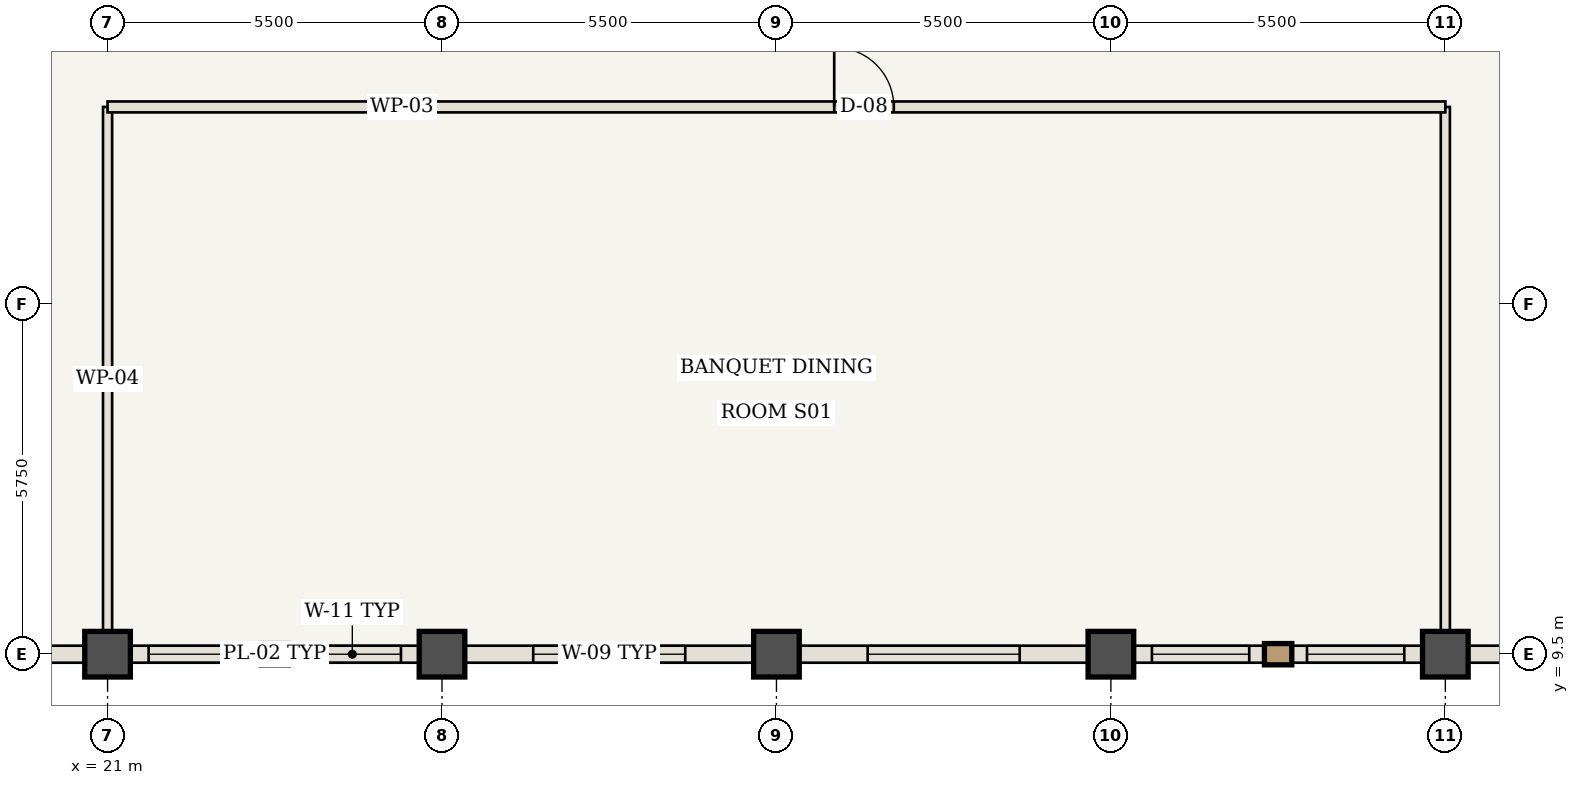
"""IFC4 building model, lengths in metres.
Left out: names, types, materials, properties, quantities, classifications, styles, units other than length and angle.
Written with IfcOpenShell. Run it as: python <this file> out.ifc"""

import sys

from ifc_helpers import new_model, si_unit, direction, frame, frame_2d, origin, origin_2d, place, context, subcontext, project, spatial, rectangle, extrude, element, fill, save


model = new_model("IFC4")
c1 = context("Model", 3, precision=1e-05, world=origin(), true_north=direction((0.0, 1.0)))
c2 = subcontext(c1, "Body", "Model", "MODEL_VIEW")
j1 = project(units=[si_unit("LENGTHUNIT", "METRE"), si_unit("PLANEANGLEUNIT", "RADIAN")], contexts=[c1])
p1 = place(None, origin())
s1 = spatial("IfcSite", under=j1, at=p1, CompositionType="ELEMENT")
p2 = place(p1, origin())
s2 = spatial("IfcBuilding", under=s1, at=p2, CompositionType="ELEMENT")
p3 = place(p2, frame((0.0, 0.0, 296.8)))
s3 = spatial("IfcBuildingStorey", under=s2, at=p3, CompositionType="ELEMENT", Elevation=296.8)
for number, where, z_axis, x_axis in (
    (1, (21.0, 9.5, 0.0), (0.0, 0.0, 1.0), (1.0, 0.0, 0.0)),
    (2, (26.5, 9.5, 0.0), (0.0, 0.0, 1.0), (1.0, 0.0, 0.0)),
    (3, (32.0, 9.5, 0.0), (0.0, 0.0, 1.0), (1.0, 0.0, 0.0)),
    (4, (37.5, 9.5, 0.0), (0.0, 0.0, 1.0), (1.0, 0.0, 0.0)),
    (5, (43.0, 9.5, 0.0), (0.0, 0.0, 1.0), (1.0, 0.0, 0.0)),
):
    element("IfcColumn", number, at=place(p3, frame(where, z_axis=z_axis, x_axis=x_axis)), inside=s3, PredefinedType="COLUMN", context=c2, shape_type="SweptSolid", body=[
        extrude(rectangle(XDim=0.75, YDim=0.75, at=origin_2d()), origin(), (0.0, 0.0, 1.0), 3.85),
    ])
for number, where, z_axis, x_axis in (
    (6, (21.0, 9.56, 0.0), (0.0, 0.0, 1.0), (0.0, 1.0, 0.0)),
    (7, (43.0, 9.56, 0.0), (0.0, 0.0, 1.0), (0.0, 1.0, 0.0)),
):
    element("IfcWall", number, at=place(p3, frame(where, z_axis=z_axis, x_axis=x_axis)), inside=s3, PredefinedType="STANDARD", context=c2, shape_type="SweptSolid", body=[
        extrude(rectangle(XDim=8.94, YDim=0.15, at=frame_2d((4.47, 0.0))), origin(), (0.0, 0.0, 1.0), 3.685),
    ])
p4 = place(p3, frame((21.0, 18.5, 0.0), z_axis=(0.0, 0.0, 1.0), x_axis=(1.0, 0.0, 0.0)))
e8 = element("IfcWall", 8, at=p4, inside=s3, PredefinedType="STANDARD", context=c2, shape_type="SweptSolid", body=[
    extrude(rectangle(XDim=22.0, YDim=0.18, at=frame_2d((11.0, 0.0))), origin(), (0.0, 0.0, 1.0), 3.685),
])
p5 = place(p4, frame((11.95, 0.0, 0.0)))
e9 = element("IfcOpeningElement", 9, at=p5, cuts=e8, PredefinedType="OPENING", context=c2, shape_type="SweptSolid", body=[
    extrude(rectangle(XDim=0.98, YDim=2.2, at=frame_2d((0.49, 1.1))), frame((0.0, 0.1, 0.0), z_axis=(0.0, -1.0, 0.0), x_axis=(1.0, 0.0, 0.0)), (0.0, 0.0, 1.0), 0.2),
])
p6 = place(p3, frame((21.0, 9.5, 0.0), z_axis=(0.0, 0.0, 1.0), x_axis=(-1.0, 0.0, 0.0)))
e10 = element("IfcWall", 10, at=p6, inside=s3, PredefinedType="USERDEFINED", context=c2, shape_type="SweptSolid", body=[
    extrude(rectangle(XDim=5.5, YDim=0.28, at=frame_2d((2.75, 0.0))), origin(), (0.0, 0.0, 1.0), 2.985),
])
p7 = place(p3, frame((26.5, 9.5, 0.0), z_axis=(0.0, 0.0, 1.0), x_axis=(-1.0, 0.0, 0.0)))
e11 = element("IfcWall", 11, at=p7, inside=s3, PredefinedType="USERDEFINED", context=c2, shape_type="SweptSolid", body=[
    extrude(rectangle(XDim=5.5, YDim=0.28, at=frame_2d((2.75, 0.0))), origin(), (0.0, 0.0, 1.0), 2.985),
])
p8 = place(p7, frame((0.675, 0.0, 0.85)))
e12 = element("IfcOpeningElement", 12, at=p8, cuts=e11, PredefinedType="OPENING", context=c2, shape_type="SweptSolid", body=[
    extrude(rectangle(XDim=1.6, YDim=1.935, at=frame_2d((0.8, 0.968))), frame((0.0, 0.15, 0.0), z_axis=(0.0, -1.0, 0.0), x_axis=(1.0, 0.0, 0.0)), (0.0, 0.0, 1.0), 0.3),
])
p9 = place(p7, frame((3.225, 0.0, 0.85)))
e13 = element("IfcOpeningElement", 13, at=p9, cuts=e11, PredefinedType="OPENING", context=c2, shape_type="SweptSolid", body=[
    extrude(rectangle(XDim=1.6, YDim=1.935, at=frame_2d((0.8, 0.968))), frame((0.0, 0.15, 0.0), z_axis=(0.0, -1.0, 0.0), x_axis=(1.0, 0.0, 0.0)), (0.0, 0.0, 1.0), 0.3),
])
p10 = place(p3, frame((32.0, 9.5, 0.0), z_axis=(0.0, 0.0, 1.0), x_axis=(-1.0, 0.0, 0.0)))
e14 = element("IfcWall", 14, at=p10, inside=s3, PredefinedType="USERDEFINED", context=c2, shape_type="SweptSolid", body=[
    extrude(rectangle(XDim=5.5, YDim=0.28, at=frame_2d((2.75, 0.0))), origin(), (0.0, 0.0, 1.0), 2.985),
])
p11 = place(p10, frame((1.5, 0.0, 0.85)))
e15 = element("IfcOpeningElement", 15, at=p11, cuts=e14, PredefinedType="OPENING", context=c2, shape_type="SweptSolid", body=[
    extrude(rectangle(XDim=2.5, YDim=1.935, at=frame_2d((1.25, 0.968))), frame((0.0, 0.15, 0.0), z_axis=(0.0, -1.0, 0.0), x_axis=(1.0, 0.0, 0.0)), (0.0, 0.0, 1.0), 0.3),
])
p12 = place(p3, frame((37.5, 9.5, 0.0), z_axis=(0.0, 0.0, 1.0), x_axis=(-1.0, 0.0, 0.0)))
e16 = element("IfcWall", 16, at=p12, inside=s3, PredefinedType="USERDEFINED", context=c2, shape_type="SweptSolid", body=[
    extrude(rectangle(XDim=5.5, YDim=0.28, at=frame_2d((2.75, 0.0))), origin(), (0.0, 0.0, 1.0), 2.985),
])
p13 = place(p12, frame((1.5, 0.0, 0.85)))
e17 = element("IfcOpeningElement", 17, at=p13, cuts=e16, PredefinedType="OPENING", context=c2, shape_type="SweptSolid", body=[
    extrude(rectangle(XDim=2.5, YDim=1.935, at=frame_2d((1.25, 0.968))), frame((0.0, 0.15, 0.0), z_axis=(0.0, -1.0, 0.0), x_axis=(1.0, 0.0, 0.0)), (0.0, 0.0, 1.0), 0.3),
])
p14 = place(p3, frame((43.0, 9.5, 0.0), z_axis=(0.0, 0.0, 1.0), x_axis=(-1.0, 0.0, 0.0)))
e18 = element("IfcWall", 18, at=p14, inside=s3, PredefinedType="USERDEFINED", context=c2, shape_type="SweptSolid", body=[
    extrude(rectangle(XDim=5.5, YDim=0.28, at=frame_2d((2.75, 0.0))), origin(), (0.0, 0.0, 1.0), 2.985),
])
p15 = place(p14, frame((0.675, 0.0, 0.85)))
e19 = element("IfcOpeningElement", 19, at=p15, cuts=e18, PredefinedType="OPENING", context=c2, shape_type="SweptSolid", body=[
    extrude(rectangle(XDim=1.6, YDim=1.935, at=frame_2d((0.8, 0.968))), frame((0.0, 0.15, 0.0), z_axis=(0.0, -1.0, 0.0), x_axis=(1.0, 0.0, 0.0)), (0.0, 0.0, 1.0), 0.3),
])
p16 = place(p14, frame((3.225, 0.0, 0.85)))
e20 = element("IfcOpeningElement", 20, at=p16, cuts=e18, PredefinedType="OPENING", context=c2, shape_type="SweptSolid", body=[
    extrude(rectangle(XDim=1.6, YDim=1.935, at=frame_2d((0.8, 0.968))), frame((0.0, 0.15, 0.0), z_axis=(0.0, -1.0, 0.0), x_axis=(1.0, 0.0, 0.0)), (0.0, 0.0, 1.0), 0.3),
])
p17 = place(p3, frame((48.5, 9.5, 0.0), z_axis=(0.0, 0.0, 1.0), x_axis=(-1.0, 0.0, 0.0)))
e21 = element("IfcWall", 21, at=p17, inside=s3, PredefinedType="USERDEFINED", context=c2, shape_type="SweptSolid", body=[
    extrude(rectangle(XDim=5.5, YDim=0.28, at=frame_2d((2.75, 0.0))), origin(), (0.0, 0.0, 1.0), 2.985),
])
p18 = place(p5, origin())
e22 = element("IfcDoor", 22, at=p18, inside=s3, OperationType="SINGLE_SWING_LEFT", PredefinedType="DOOR", context=c2, shape_type="SweptSolid", body=[
    extrude(rectangle(XDim=0.98, YDim=2.2, at=frame_2d((0.49, 1.1))), frame((0.0, 0.025, 0.0), z_axis=(0.0, -1.0, 0.0), x_axis=(1.0, 0.0, 0.0)), (0.0, 0.0, 1.0), 0.05),
])
fill(e9, e22)
p19 = place(p8, origin())
e23 = element("IfcWindow", 23, at=p19, inside=s3, PartitioningType="SINGLE_PANEL", PredefinedType="WINDOW", context=c2, shape_type="SweptSolid", body=[
    extrude(rectangle(XDim=1.6, YDim=1.935, at=frame_2d((0.8, 0.968))), frame((0.0, 0.03, 0.0), z_axis=(0.0, -1.0, 0.0), x_axis=(1.0, 0.0, 0.0)), (0.0, 0.0, 1.0), 0.06),
])
fill(e12, e23)
p20 = place(p9, origin())
e24 = element("IfcWindow", 24, at=p20, inside=s3, PartitioningType="SINGLE_PANEL", PredefinedType="WINDOW", context=c2, shape_type="SweptSolid", body=[
    extrude(rectangle(XDim=1.6, YDim=1.935, at=frame_2d((0.8, 0.968))), frame((0.0, 0.03, 0.0), z_axis=(0.0, -1.0, 0.0), x_axis=(1.0, 0.0, 0.0)), (0.0, 0.0, 1.0), 0.06),
])
fill(e13, e24)
p21 = place(p11, origin())
e25 = element("IfcWindow", 25, at=p21, inside=s3, PartitioningType="SINGLE_PANEL", PredefinedType="WINDOW", context=c2, shape_type="SweptSolid", body=[
    extrude(rectangle(XDim=2.5, YDim=1.935, at=frame_2d((1.25, 0.968))), frame((0.0, 0.03, 0.0), z_axis=(0.0, -1.0, 0.0), x_axis=(1.0, 0.0, 0.0)), (0.0, 0.0, 1.0), 0.06),
])
fill(e15, e25)
p22 = place(p13, origin())
e26 = element("IfcWindow", 26, at=p22, inside=s3, PartitioningType="SINGLE_PANEL", PredefinedType="WINDOW", context=c2, shape_type="SweptSolid", body=[
    extrude(rectangle(XDim=2.5, YDim=1.935, at=frame_2d((1.25, 0.968))), frame((0.0, 0.03, 0.0), z_axis=(0.0, -1.0, 0.0), x_axis=(1.0, 0.0, 0.0)), (0.0, 0.0, 1.0), 0.06),
])
fill(e17, e26)
p23 = place(p15, origin())
e27 = element("IfcWindow", 27, at=p23, inside=s3, PartitioningType="SINGLE_PANEL", PredefinedType="WINDOW", context=c2, shape_type="SweptSolid", body=[
    extrude(rectangle(XDim=1.6, YDim=1.935, at=frame_2d((0.8, 0.968))), frame((0.0, 0.03, 0.0), z_axis=(0.0, -1.0, 0.0), x_axis=(1.0, 0.0, 0.0)), (0.0, 0.0, 1.0), 0.06),
])
fill(e19, e27)
p24 = place(p16, origin())
e28 = element("IfcWindow", 28, at=p24, inside=s3, PartitioningType="SINGLE_PANEL", PredefinedType="WINDOW", context=c2, shape_type="SweptSolid", body=[
    extrude(rectangle(XDim=1.6, YDim=1.935, at=frame_2d((0.8, 0.968))), frame((0.0, 0.03, 0.0), z_axis=(0.0, -1.0, 0.0), x_axis=(1.0, 0.0, 0.0)), (0.0, 0.0, 1.0), 0.06),
])
fill(e20, e28)
save(model, sys.argv[1])
